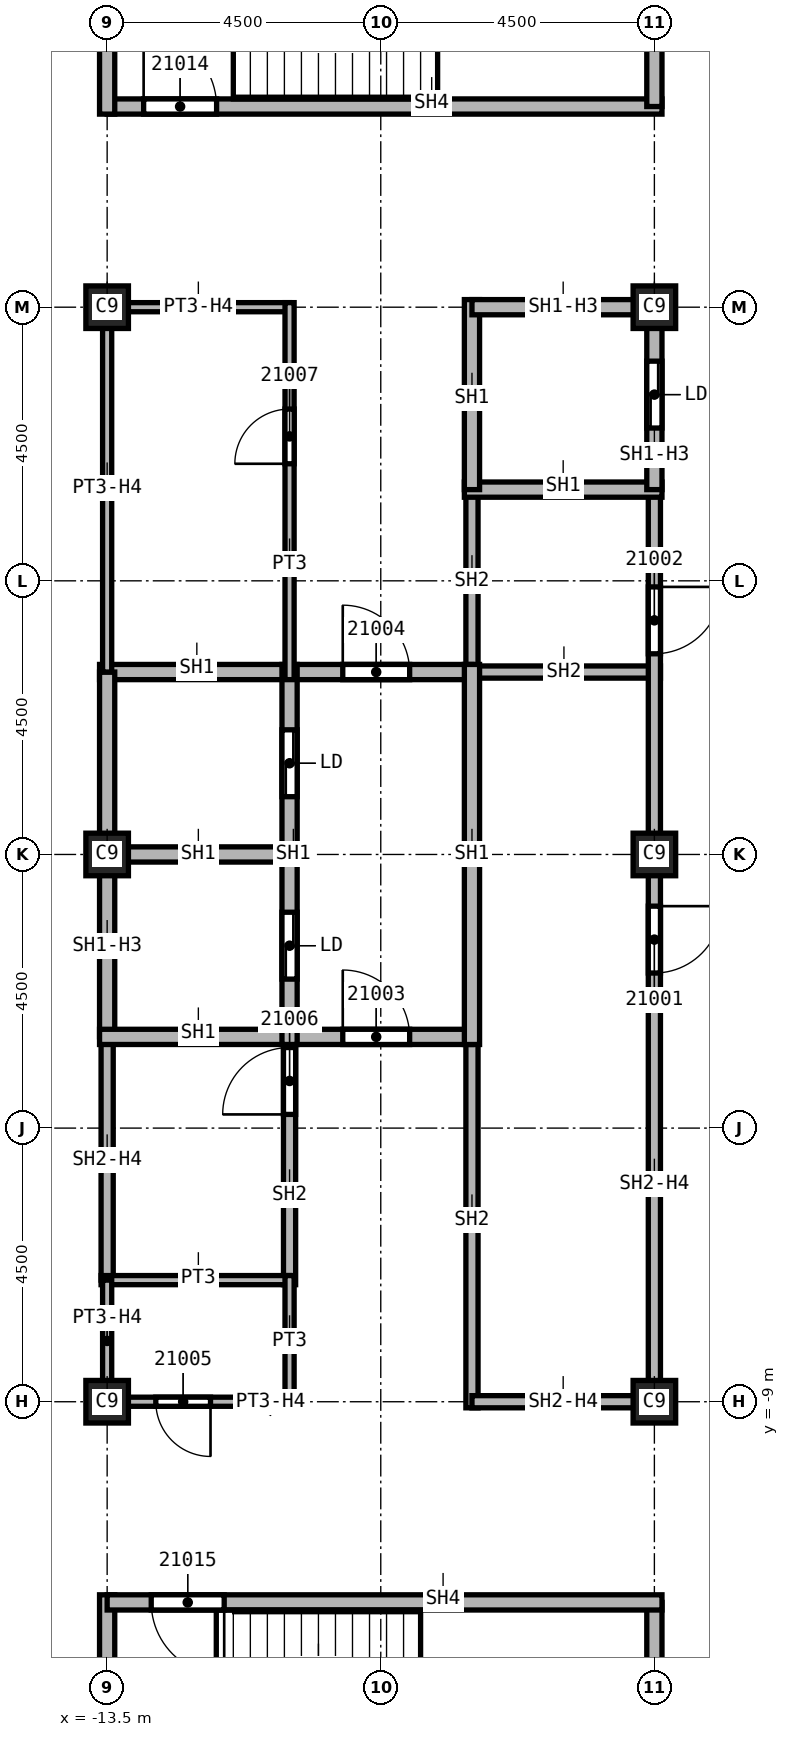
"""IFC4 building model, lengths in metres.
Left out: names, types, materials, properties, quantities, classifications, styles, units other than length and angle.
Written with IfcOpenShell. Run it as: python <this file> out.ifc"""

import sys

from ifc_helpers import new_model, si_unit, direction, frame, frame_2d, origin, origin_2d, place, context, subcontext, project, spatial, rectangle, extrude, element, fill, save


model = new_model("IFC4")
c1 = context("Model", 3, precision=1e-05, world=origin(), true_north=direction((0.0, 1.0)))
c2 = subcontext(c1, "Body", "Model", "MODEL_VIEW")
j1 = project(units=[si_unit("LENGTHUNIT", "METRE"), si_unit("PLANEANGLEUNIT", "RADIAN")], contexts=[c1])
p1 = place(None, origin())
s1 = spatial("IfcSite", under=j1, at=p1, CompositionType="ELEMENT")
p2 = place(p1, origin())
s2 = spatial("IfcBuilding", under=s1, at=p2, CompositionType="ELEMENT")
p3 = place(p2, frame((0.0, 0.0, 300.0)))
s3 = spatial("IfcBuildingStorey", under=s2, at=p3, CompositionType="ELEMENT", Elevation=300.0)
for number, where, z_axis, x_axis in (
    (1, (-4.5, 0.0, 0.0), (0.0, 0.0, 1.0), (1.0, 0.0, 0.0)),
    (2, (-4.5, 9.0, 0.0), (0.0, 0.0, 1.0), (1.0, 0.0, 0.0)),
    (3, (-4.5, -9.0, 0.0), (0.0, 0.0, 1.0), (1.0, 0.0, 0.0)),
    (4, (-13.5, 0.0, 0.0), (0.0, 0.0, 1.0), (1.0, 0.0, 0.0)),
    (5, (-13.5, 9.0, 0.0), (0.0, 0.0, 1.0), (1.0, 0.0, 0.0)),
    (6, (-13.5, -9.0, 0.0), (0.0, 0.0, 1.0), (1.0, 0.0, 0.0)),
):
    element("IfcColumn", number, at=place(p3, frame(where, z_axis=z_axis, x_axis=x_axis)), inside=s3, PredefinedType="COLUMN", context=c2, shape_type="SweptSolid", body=[
        extrude(rectangle(XDim=0.7, YDim=0.7, at=origin_2d()), origin(), (0.0, 0.0, 1.0), 3.74),
    ])
p4 = place(p3, frame((-13.5, -7.0, 0.0), z_axis=(0.0, 0.0, 1.0), x_axis=(0.0, 1.0, 0.0)))
e7 = element("IfcWall", 7, at=p4, inside=s3, PredefinedType="SOLIDWALL", context=c2, shape_type="SweptSolid", body=[
    extrude(rectangle(XDim=4.0, YDim=0.2, at=frame_2d((2.0, 0.0))), origin(), (0.0, 0.0, 1.0), 3.062),
])
p5 = place(p3, frame((-10.5, -7.075, 0.0), z_axis=(0.0, 0.0, 1.0), x_axis=(0.0, 1.0, 0.0)))
e8 = element("IfcWall", 8, at=p5, inside=s3, PredefinedType="SOLIDWALL", context=c2, shape_type="SweptSolid", body=[
    extrude(rectangle(XDim=4.2, YDim=0.2, at=frame_2d((2.1, 0.0))), origin(), (0.0, 0.0, 1.0), 3.74),
])
p6 = place(p5, frame((2.8, 0.0, 0.0)))
e9 = element("IfcOpeningElement", 9, at=p6, cuts=e8, PredefinedType="OPENING", context=c2, shape_type="SweptSolid", body=[
    extrude(rectangle(XDim=1.1, YDim=2.1, at=frame_2d((0.55, 1.05))), frame((0.0, 0.1, 0.0), z_axis=(0.0, -1.0, 0.0), x_axis=(1.0, 0.0, 0.0)), (0.0, 0.0, 1.0), 0.2),
])
p7 = place(p3, frame((-7.625, 3.0, 0.0), z_axis=(0.0, 0.0, 1.0), x_axis=(1.0, 0.0, 0.0)))
e10 = element("IfcWall", 10, at=p7, inside=s3, PredefinedType="SOLIDWALL", context=c2, shape_type="SweptSolid", body=[
    extrude(rectangle(XDim=3.225, YDim=0.2, at=frame_2d((1.613, 0.0))), origin(), (0.0, 0.0, 1.0), 3.74),
])
p8 = place(p3, frame((-7.5, -9.1, 0.0), z_axis=(0.0, 0.0, 1.0), x_axis=(0.0, 1.0, 0.0)))
e11 = element("IfcWall", 11, at=p8, inside=s3, PredefinedType="SOLIDWALL", context=c2, shape_type="SweptSolid", body=[
    extrude(rectangle(XDim=6.225, YDim=0.2, at=frame_2d((3.113, 0.0))), origin(), (0.0, 0.0, 1.0), 3.74),
])
p9 = place(p3, frame((-7.5, 2.875, 0.0), z_axis=(0.0, 0.0, 1.0), x_axis=(0.0, 1.0, 0.0)))
e12 = element("IfcWall", 12, at=p9, inside=s3, PredefinedType="SOLIDWALL", context=c2, shape_type="SweptSolid", body=[
    extrude(rectangle(XDim=3.125, YDim=0.2, at=frame_2d((1.562, 0.0))), origin(), (0.0, 0.0, 1.0), 3.74),
])
p10 = place(p3, frame((-4.5, -9.0, 0.0), z_axis=(0.0, 0.0, 1.0), x_axis=(-1.0, 0.0, 0.0)))
e13 = element("IfcWall", 13, at=p10, inside=s3, PredefinedType="SOLIDWALL", context=c2, shape_type="SweptSolid", body=[
    extrude(rectangle(XDim=3.0, YDim=0.2, at=frame_2d((1.5, 0.0))), origin(), (0.0, 0.0, 1.0), 3.062),
])
p11 = place(p3, frame((-4.5, 6.0, 0.0), z_axis=(0.0, 0.0, 1.0), x_axis=(0.0, -1.0, 0.0)))
e14 = element("IfcWall", 14, at=p11, inside=s3, PredefinedType="SOLIDWALL", context=c2, shape_type="SweptSolid", body=[
    extrude(rectangle(XDim=15.1, YDim=0.2, at=frame_2d((7.55, 0.0))), origin(), (0.0, 0.0, 1.0), 3.062),
])
p12 = place(p11, frame((6.85, 0.0, 0.0)))
e15 = element("IfcOpeningElement", 15, at=p12, cuts=e14, PredefinedType="OPENING", context=c2, shape_type="SweptSolid", body=[
    extrude(rectangle(XDim=1.1, YDim=2.1, at=frame_2d((0.55, 1.05))), frame((0.0, 0.1, 0.0), z_axis=(0.0, -1.0, 0.0), x_axis=(1.0, 0.0, 0.0)), (0.0, 0.0, 1.0), 0.2),
])
p13 = place(p11, frame((1.6, 0.0, 0.0)))
e16 = element("IfcOpeningElement", 16, at=p13, cuts=e14, PredefinedType="OPENING", context=c2, shape_type="SweptSolid", body=[
    extrude(rectangle(XDim=1.1, YDim=2.1, at=frame_2d((0.55, 1.05))), frame((0.0, 0.1, 0.0), z_axis=(0.0, -1.0, 0.0), x_axis=(1.0, 0.0, 0.0)), (0.0, 0.0, 1.0), 0.2),
])
p14 = place(p3, frame((-13.625, 0.0, 0.0), z_axis=(0.0, 0.0, 1.0), x_axis=(1.0, 0.0, 0.0)))
e17 = element("IfcWall", 17, at=p14, inside=s3, PredefinedType="SOLIDWALL", context=c2, shape_type="SweptSolid", body=[
    extrude(rectangle(XDim=3.125, YDim=0.25, at=frame_2d((1.562, 0.0))), origin(), (0.0, 0.0, 1.0), 3.74),
])
p15 = place(p3, frame((-13.625, 3.0, 0.0), z_axis=(0.0, 0.0, 1.0), x_axis=(1.0, 0.0, 0.0)))
e18 = element("IfcWall", 18, at=p15, inside=s3, PredefinedType="SOLIDWALL", context=c2, shape_type="SweptSolid", body=[
    extrude(rectangle(XDim=6.125, YDim=0.25, at=frame_2d((3.062, 0.0))), origin(), (0.0, 0.0, 1.0), 3.74),
])
p16 = place(p15, frame((4.0, 0.0, 0.0)))
e19 = element("IfcOpeningElement", 19, at=p16, cuts=e18, PredefinedType="OPENING", context=c2, shape_type="SweptSolid", body=[
    extrude(rectangle(XDim=1.1, YDim=2.1, at=frame_2d((0.55, 1.05))), frame((0.0, 0.125, 0.0), z_axis=(0.0, -1.0, 0.0), x_axis=(1.0, 0.0, 0.0)), (0.0, 0.0, 1.0), 0.25),
])
p17 = place(p3, frame((-13.5, -3.0, 0.0), z_axis=(0.0, 0.0, 1.0), x_axis=(0.0, 1.0, 0.0)))
e20 = element("IfcWall", 20, at=p17, inside=s3, PredefinedType="SOLIDWALL", context=c2, shape_type="SweptSolid", body=[
    extrude(rectangle(XDim=6.0, YDim=0.25, at=frame_2d((3.0, 0.0))), origin(), (0.0, 0.0, 1.0), 3.062),
])
p18 = place(p3, frame((-13.625, -3.0, 0.0), z_axis=(0.0, 0.0, 1.0), x_axis=(1.0, 0.0, 0.0)))
e21 = element("IfcWall", 21, at=p18, inside=s3, PredefinedType="SOLIDWALL", context=c2, shape_type="SweptSolid", body=[
    extrude(rectangle(XDim=6.125, YDim=0.25, at=frame_2d((3.062, 0.0))), origin(), (0.0, 0.0, 1.0), 3.74),
])
p19 = place(p18, frame((4.0, 0.0, 0.0)))
e22 = element("IfcOpeningElement", 22, at=p19, cuts=e21, PredefinedType="OPENING", context=c2, shape_type="SweptSolid", body=[
    extrude(rectangle(XDim=1.1, YDim=2.1, at=frame_2d((0.55, 1.05))), frame((0.0, 0.125, 0.0), z_axis=(0.0, -1.0, 0.0), x_axis=(1.0, 0.0, 0.0)), (0.0, 0.0, 1.0), 0.25),
])
p20 = place(p3, frame((-10.5, -3.125, 0.0), z_axis=(0.0, 0.0, 1.0), x_axis=(0.0, 1.0, 0.0)))
e23 = element("IfcWall", 23, at=p20, inside=s3, PredefinedType="SOLIDWALL", context=c2, shape_type="SweptSolid", body=[
    extrude(rectangle(XDim=6.25, YDim=0.25, at=frame_2d((3.125, 0.0))), origin(), (0.0, 0.0, 1.0), 3.74),
])
p21 = place(p20, frame((1.075, 0.0, 0.0)))
e24 = element("IfcOpeningElement", 24, at=p21, cuts=e23, PredefinedType="OPENING", context=c2, shape_type="SweptSolid", body=[
    extrude(rectangle(XDim=1.1, YDim=2.1, at=frame_2d((0.55, 1.05))), frame((0.0, 0.125, 0.0), z_axis=(0.0, -1.0, 0.0), x_axis=(1.0, 0.0, 0.0)), (0.0, 0.0, 1.0), 0.25),
])
p22 = place(p20, frame((4.075, 0.0, 0.0)))
e25 = element("IfcOpeningElement", 25, at=p22, cuts=e23, PredefinedType="OPENING", context=c2, shape_type="SweptSolid", body=[
    extrude(rectangle(XDim=1.1, YDim=2.1, at=frame_2d((0.55, 1.05))), frame((0.0, 0.125, 0.0), z_axis=(0.0, -1.0, 0.0), x_axis=(1.0, 0.0, 0.0)), (0.0, 0.0, 1.0), 0.25),
])
p23 = place(p3, frame((-7.625, 6.0, 0.0), z_axis=(0.0, 0.0, 1.0), x_axis=(1.0, 0.0, 0.0)))
e26 = element("IfcWall", 26, at=p23, inside=s3, PredefinedType="SOLIDWALL", context=c2, shape_type="SweptSolid", body=[
    extrude(rectangle(XDim=3.25, YDim=0.25, at=frame_2d((1.625, 0.0))), origin(), (0.0, 0.0, 1.0), 3.74),
])
p24 = place(p3, frame((-7.5, -3.125, 0.0), z_axis=(0.0, 0.0, 1.0), x_axis=(0.0, 1.0, 0.0)))
e27 = element("IfcWall", 27, at=p24, inside=s3, PredefinedType="SOLIDWALL", context=c2, shape_type="SweptSolid", body=[
    extrude(rectangle(XDim=6.25, YDim=0.25, at=frame_2d((3.125, 0.0))), origin(), (0.0, 0.0, 1.0), 3.74),
])
p25 = place(p3, frame((-7.5, 6.0, 0.0), z_axis=(0.0, 0.0, 1.0), x_axis=(0.0, 1.0, 0.0)))
e28 = element("IfcWall", 28, at=p25, inside=s3, PredefinedType="SOLIDWALL", context=c2, shape_type="SweptSolid", body=[
    extrude(rectangle(XDim=3.125, YDim=0.25, at=frame_2d((1.562, 0.0))), origin(), (0.0, 0.0, 1.0), 3.74),
])
p26 = place(p3, frame((-7.5, 9.0, 0.0), z_axis=(0.0, 0.0, 1.0), x_axis=(1.0, 0.0, 0.0)))
e29 = element("IfcWall", 29, at=p26, inside=s3, PredefinedType="SOLIDWALL", context=c2, shape_type="SweptSolid", body=[
    extrude(rectangle(XDim=3.0, YDim=0.25, at=frame_2d((1.5, 0.0))), origin(), (0.0, 0.0, 1.0), 3.062),
])
p27 = place(p3, frame((-4.5, 9.125, 0.0), z_axis=(0.0, 0.0, 1.0), x_axis=(0.0, -1.0, 0.0)))
e30 = element("IfcWall", 30, at=p27, inside=s3, PredefinedType="SOLIDWALL", context=c2, shape_type="SweptSolid", body=[
    extrude(rectangle(XDim=3.125, YDim=0.25, at=frame_2d((1.562, 0.0))), origin(), (0.0, 0.0, 1.0), 3.062),
])
p28 = place(p27, frame((1.012, 0.0, 0.0)))
e31 = element("IfcOpeningElement", 31, at=p28, cuts=e30, PredefinedType="OPENING", context=c2, shape_type="SweptSolid", body=[
    extrude(rectangle(XDim=1.1, YDim=2.1, at=frame_2d((0.55, 1.05))), frame((0.0, 0.125, 0.0), z_axis=(0.0, -1.0, 0.0), x_axis=(1.0, 0.0, 0.0)), (0.0, 0.0, 1.0), 0.25),
])
p29 = place(p3, frame((-13.5, -12.175, 0.0), z_axis=(0.0, 0.0, 1.0), x_axis=(0.0, -1.0, 0.0)))
e32 = element("IfcWall", 32, at=p29, inside=s3, PredefinedType="SOLIDWALL", context=c2, shape_type="SweptSolid", body=[
    extrude(rectangle(XDim=4.75, YDim=0.25, at=frame_2d((2.375, 0.0))), origin(), (0.0, 0.0, 1.0), 3.74),
])
p30 = place(p3, frame((-13.5, 12.3, 0.0), z_axis=(0.0, 0.0, 1.0), x_axis=(1.0, 0.0, 0.0)))
e33 = element("IfcWall", 33, at=p30, inside=s3, PredefinedType="SOLIDWALL", context=c2, shape_type="SweptSolid", body=[
    extrude(rectangle(XDim=9.125, YDim=0.25, at=frame_2d((4.562, 0.0))), origin(), (0.0, 0.0, 1.0), 3.74),
])
p31 = place(p30, frame((0.6, 0.0, 0.0)))
e34 = element("IfcOpeningElement", 34, at=p31, cuts=e33, PredefinedType="OPENING", context=c2, shape_type="SweptSolid", body=[
    extrude(rectangle(XDim=1.2, YDim=2.1, at=frame_2d((0.6, 1.05))), frame((0.0, 0.125, 0.0), z_axis=(0.0, -1.0, 0.0), x_axis=(1.0, 0.0, 0.0)), (0.0, 0.0, 1.0), 0.25),
])
p32 = place(p3, frame((-13.5, 12.175, 0.0), z_axis=(0.0, 0.0, 1.0), x_axis=(0.0, 1.0, 0.0)))
e35 = element("IfcWall", 35, at=p32, inside=s3, PredefinedType="SOLIDWALL", context=c2, shape_type="SweptSolid", body=[
    extrude(rectangle(XDim=4.75, YDim=0.25, at=frame_2d((2.375, 0.0))), origin(), (0.0, 0.0, 1.0), 3.74),
])
p33 = place(p3, frame((-4.5, -12.3, 0.0), z_axis=(0.0, 0.0, 1.0), x_axis=(0.0, -1.0, 0.0)))
e36 = element("IfcWall", 36, at=p33, inside=s3, PredefinedType="SOLIDWALL", context=c2, shape_type="SweptSolid", body=[
    extrude(rectangle(XDim=4.625, YDim=0.25, at=frame_2d((2.312, 0.0))), origin(), (0.0, 0.0, 1.0), 3.74),
])
p34 = place(p3, frame((-4.5, 16.8, 0.0), z_axis=(0.0, 0.0, 1.0), x_axis=(0.0, -1.0, 0.0)))
e37 = element("IfcWall", 37, at=p34, inside=s3, PredefinedType="SOLIDWALL", context=c2, shape_type="SweptSolid", body=[
    extrude(rectangle(XDim=4.5, YDim=0.25, at=frame_2d((2.25, 0.0))), origin(), (0.0, 0.0, 1.0), 3.74),
])
p35 = place(p3, frame((-4.375, -12.3, 0.0), z_axis=(0.0, 0.0, 1.0), x_axis=(-1.0, 0.0, 0.0)))
e38 = element("IfcWall", 38, at=p35, inside=s3, PredefinedType="SOLIDWALL", context=c2, shape_type="SweptSolid", body=[
    extrude(rectangle(XDim=9.125, YDim=0.25, at=frame_2d((4.562, 0.0))), origin(), (0.0, 0.0, 1.0), 3.74),
])
p36 = place(p35, frame((7.2, 0.0, 0.0)))
e39 = element("IfcOpeningElement", 39, at=p36, cuts=e38, PredefinedType="OPENING", context=c2, shape_type="SweptSolid", body=[
    extrude(rectangle(XDim=1.2, YDim=2.1, at=frame_2d((0.6, 1.05))), frame((0.0, 0.125, 0.0), z_axis=(0.0, -1.0, 0.0), x_axis=(1.0, 0.0, 0.0)), (0.0, 0.0, 1.0), 0.25),
])
p37 = place(p3, frame((-13.6, -7.0, 0.0), z_axis=(0.0, 0.0, 1.0), x_axis=(1.0, 0.0, 0.0)))
e40 = element("IfcWall", 40, at=p37, inside=s3, PredefinedType="PARTITIONING", context=c2, shape_type="SweptSolid", body=[
    extrude(rectangle(XDim=3.1, YDim=0.15, at=frame_2d((1.55, 0.0))), origin(), (0.0, 0.0, 1.0), 3.74),
])
p38 = place(p3, frame((-13.5, -9.075, 0.0), z_axis=(0.0, 0.0, 1.0), x_axis=(0.0, 1.0, 0.0)))
e41 = element("IfcWall", 41, at=p38, inside=s3, PredefinedType="PARTITIONING", context=c2, shape_type="SweptSolid", body=[
    extrude(rectangle(XDim=2.075, YDim=0.15, at=frame_2d((1.038, 0.0))), origin(), (0.0, 0.0, 1.0), 3.062),
])
p39 = place(p3, frame((-13.5, 3.0, 0.0), z_axis=(0.0, 0.0, 1.0), x_axis=(0.0, 1.0, 0.0)))
e42 = element("IfcWall", 42, at=p39, inside=s3, PredefinedType="PARTITIONING", context=c2, shape_type="SweptSolid", body=[
    extrude(rectangle(XDim=6.075, YDim=0.15, at=frame_2d((3.038, 0.0))), origin(), (0.0, 0.0, 1.0), 3.062),
])
p40 = place(p3, frame((-13.5, 9.0, 0.0), z_axis=(0.0, 0.0, 1.0), x_axis=(1.0, 0.0, 0.0)))
e43 = element("IfcWall", 43, at=p40, inside=s3, PredefinedType="PARTITIONING", context=c2, shape_type="SweptSolid", body=[
    extrude(rectangle(XDim=3.0, YDim=0.15, at=frame_2d((1.5, 0.0))), origin(), (0.0, 0.0, 1.0), 3.062),
])
p41 = place(p3, frame((-10.5, -9.075, 0.0), z_axis=(0.0, 0.0, 1.0), x_axis=(0.0, 1.0, 0.0)))
e44 = element("IfcWall", 44, at=p41, inside=s3, PredefinedType="PARTITIONING", context=c2, shape_type="SweptSolid", body=[
    extrude(rectangle(XDim=2.15, YDim=0.15, at=frame_2d((1.075, 0.0))), origin(), (0.0, 0.0, 1.0), 3.74),
])
p42 = place(p3, frame((-10.5, -9.0, 0.0), z_axis=(0.0, 0.0, 1.0), x_axis=(-1.0, 0.0, 0.0)))
e45 = element("IfcWall", 45, at=p42, inside=s3, PredefinedType="PARTITIONING", context=c2, shape_type="SweptSolid", body=[
    extrude(rectangle(XDim=3.0, YDim=0.15, at=frame_2d((1.5, 0.0))), origin(), (0.0, 0.0, 1.0), 3.062),
])
p43 = place(p42, frame((1.3, 0.0, 0.0)))
e46 = element("IfcOpeningElement", 46, at=p43, cuts=e45, PredefinedType="OPENING", context=c2, shape_type="SweptSolid", body=[
    extrude(rectangle(XDim=0.9, YDim=2.1, at=frame_2d((0.45, 1.05))), frame((0.0, 0.075, 0.0), z_axis=(0.0, -1.0, 0.0), x_axis=(1.0, 0.0, 0.0)), (0.0, 0.0, 1.0), 0.15),
])
p44 = place(p3, frame((-10.5, 2.875, 0.0), z_axis=(0.0, 0.0, 1.0), x_axis=(0.0, 1.0, 0.0)))
e47 = element("IfcWall", 47, at=p44, inside=s3, PredefinedType="PARTITIONING", context=c2, shape_type="SweptSolid", body=[
    extrude(rectangle(XDim=6.2, YDim=0.15, at=frame_2d((3.1, 0.0))), origin(), (0.0, 0.0, 1.0), 3.74),
])
p45 = place(p44, frame((3.55, 0.0, 0.0)))
e48 = element("IfcOpeningElement", 48, at=p45, cuts=e47, PredefinedType="OPENING", context=c2, shape_type="SweptSolid", body=[
    extrude(rectangle(XDim=0.9, YDim=2.1, at=frame_2d((0.45, 1.05))), frame((0.0, 0.075, 0.0), z_axis=(0.0, -1.0, 0.0), x_axis=(1.0, 0.0, 0.0)), (0.0, 0.0, 1.0), 0.15),
])
p46 = place(p12, origin())
e49 = element("IfcDoor", 49, at=p46, inside=s3, OperationType="SINGLE_SWING_RIGHT", PredefinedType="DOOR", context=c2, shape_type="SweptSolid", body=[
    extrude(rectangle(XDim=1.1, YDim=2.1, at=frame_2d((0.55, 1.05))), frame((0.0, 0.025, 0.0), z_axis=(0.0, -1.0, 0.0), x_axis=(1.0, 0.0, 0.0)), (0.0, 0.0, 1.0), 0.05),
])
fill(e15, e49)
p47 = place(p13, origin())
e50 = element("IfcDoor", 50, at=p47, inside=s3, OperationType="SINGLE_SWING_LEFT", PredefinedType="DOOR", context=c2, shape_type="SweptSolid", body=[
    extrude(rectangle(XDim=1.1, YDim=2.1, at=frame_2d((0.55, 1.05))), frame((0.0, 0.025, 0.0), z_axis=(0.0, -1.0, 0.0), x_axis=(1.0, 0.0, 0.0)), (0.0, 0.0, 1.0), 0.05),
])
fill(e16, e50)
p48 = place(p19, origin())
e51 = element("IfcDoor", 51, at=p48, inside=s3, OperationType="SINGLE_SWING_RIGHT", PredefinedType="DOOR", context=c2, shape_type="SweptSolid", body=[
    extrude(rectangle(XDim=1.1, YDim=2.1, at=frame_2d((0.55, 1.05))), frame((0.0, 0.025, 0.0), z_axis=(0.0, -1.0, 0.0), x_axis=(1.0, 0.0, 0.0)), (0.0, 0.0, 1.0), 0.05),
])
fill(e22, e51)
p49 = place(p16, origin())
e52 = element("IfcDoor", 52, at=p49, inside=s3, OperationType="SINGLE_SWING_LEFT", PredefinedType="DOOR", context=c2, shape_type="SweptSolid", body=[
    extrude(rectangle(XDim=1.1, YDim=2.1, at=frame_2d((0.55, 1.05))), frame((0.0, 0.025, 0.0), z_axis=(0.0, -1.0, 0.0), x_axis=(1.0, 0.0, 0.0)), (0.0, 0.0, 1.0), 0.05),
])
fill(e19, e52)
p50 = place(p43, origin())
e53 = element("IfcDoor", 53, at=p50, inside=s3, OperationType="SINGLE_SWING_RIGHT", PredefinedType="DOOR", context=c2, shape_type="SweptSolid", body=[
    extrude(rectangle(XDim=0.9, YDim=2.1, at=frame_2d((0.45, 1.05))), frame((0.0, 0.025, 0.0), z_axis=(0.0, -1.0, 0.0), x_axis=(1.0, 0.0, 0.0)), (0.0, 0.0, 1.0), 0.05),
])
fill(e46, e53)
p51 = place(p6, origin())
e54 = element("IfcDoor", 54, at=p51, inside=s3, OperationType="SINGLE_SWING_LEFT", PredefinedType="DOOR", context=c2, shape_type="SweptSolid", body=[
    extrude(rectangle(XDim=1.1, YDim=2.1, at=frame_2d((0.55, 1.05))), frame((0.0, 0.025, 0.0), z_axis=(0.0, -1.0, 0.0), x_axis=(1.0, 0.0, 0.0)), (0.0, 0.0, 1.0), 0.05),
])
fill(e9, e54)
p52 = place(p45, origin())
e55 = element("IfcDoor", 55, at=p52, inside=s3, OperationType="SINGLE_SWING_RIGHT", PredefinedType="DOOR", context=c2, shape_type="SweptSolid", body=[
    extrude(rectangle(XDim=0.9, YDim=2.1, at=frame_2d((0.45, 1.05))), frame((0.0, 0.025, 0.0), z_axis=(0.0, -1.0, 0.0), x_axis=(1.0, 0.0, 0.0)), (0.0, 0.0, 1.0), 0.05),
])
fill(e48, e55)
p53 = place(p31, origin())
e56 = element("IfcDoor", 56, at=p53, inside=s3, OperationType="SINGLE_SWING_LEFT", PredefinedType="DOOR", context=c2, shape_type="SweptSolid", body=[
    extrude(rectangle(XDim=1.2, YDim=2.1, at=frame_2d((0.6, 1.05))), frame((0.0, 0.025, 0.0), z_axis=(0.0, -1.0, 0.0), x_axis=(1.0, 0.0, 0.0)), (0.0, 0.0, 1.0), 0.05),
])
fill(e34, e56)
p54 = place(p36, origin())
e57 = element("IfcDoor", 57, at=p54, inside=s3, OperationType="SINGLE_SWING_RIGHT", PredefinedType="DOOR", context=c2, shape_type="SweptSolid", body=[
    extrude(rectangle(XDim=1.2, YDim=2.1, at=frame_2d((0.6, 1.05))), frame((0.0, 0.025, 0.0), z_axis=(0.0, -1.0, 0.0), x_axis=(1.0, 0.0, 0.0)), (0.0, 0.0, 1.0), 0.05),
])
fill(e39, e57)
p55 = place(p28, origin())
e58 = element("IfcDoor", 58, at=p55, inside=s3, OperationType="SLIDING_TO_LEFT", PredefinedType="DOOR", context=c2, shape_type="SweptSolid", body=[
    extrude(rectangle(XDim=1.1, YDim=2.1, at=frame_2d((0.55, 1.05))), frame((0.0, 0.025, 0.0), z_axis=(0.0, -1.0, 0.0), x_axis=(1.0, 0.0, 0.0)), (0.0, 0.0, 1.0), 0.05),
])
fill(e31, e58)
p56 = place(p21, origin())
e59 = element("IfcDoor", 59, at=p56, inside=s3, OperationType="SLIDING_TO_LEFT", PredefinedType="DOOR", context=c2, shape_type="SweptSolid", body=[
    extrude(rectangle(XDim=1.1, YDim=2.1, at=frame_2d((0.55, 1.05))), frame((0.0, 0.025, 0.0), z_axis=(0.0, -1.0, 0.0), x_axis=(1.0, 0.0, 0.0)), (0.0, 0.0, 1.0), 0.05),
])
fill(e24, e59)
p57 = place(p22, origin())
e60 = element("IfcDoor", 60, at=p57, inside=s3, OperationType="SLIDING_TO_LEFT", PredefinedType="DOOR", context=c2, shape_type="SweptSolid", body=[
    extrude(rectangle(XDim=1.1, YDim=2.1, at=frame_2d((0.55, 1.05))), frame((0.0, 0.025, 0.0), z_axis=(0.0, -1.0, 0.0), x_axis=(1.0, 0.0, 0.0)), (0.0, 0.0, 1.0), 0.05),
])
fill(e25, e60)
save(model, sys.argv[1])
